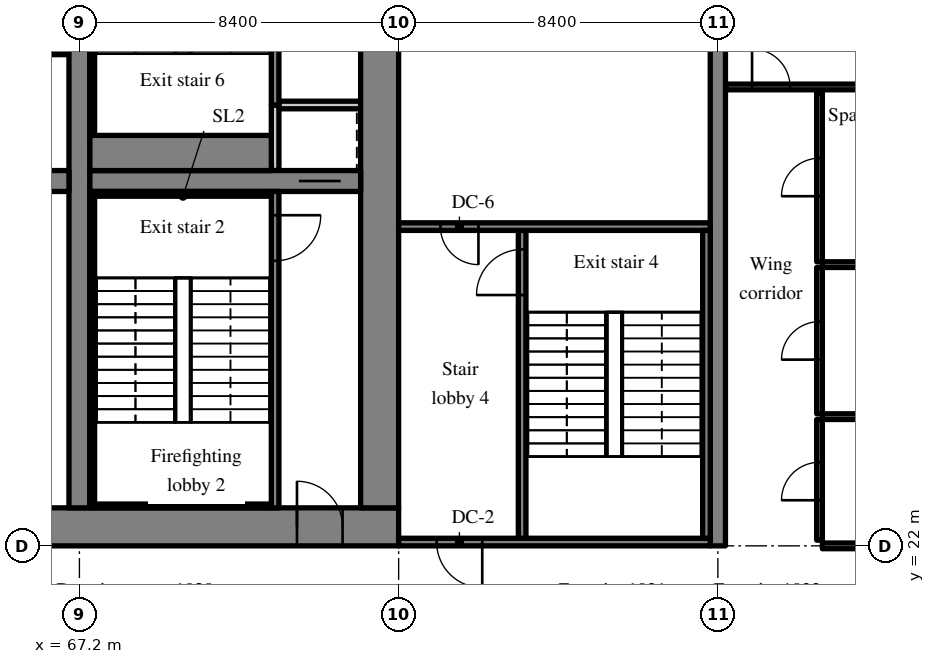
"""IFC4 building model, lengths in metres.
Left out: names, types, materials, properties, quantities, classifications, styles, units other than length and angle.
Written with IfcOpenShell. Run it as: python <this file> out.ifc"""

import sys

from ifc_helpers import new_model, si_unit, direction, frame, frame_2d, origin, place, context, subcontext, project, spatial, rectangle, extrude, source, transform, mapped, element, fill, save


model = new_model("IFC4")
c1 = context("Model", 3, precision=1e-05, world=origin(), true_north=direction((0.0, 1.0)))
c2 = subcontext(c1, "Body", "Model", "MODEL_VIEW")
j1 = project(units=[si_unit("LENGTHUNIT", "METRE"), si_unit("PLANEANGLEUNIT", "RADIAN")], contexts=[c1])
p1 = place(None, origin())
s1 = spatial("IfcSite", under=j1, at=p1, CompositionType="ELEMENT")
p2 = place(p1, origin())
s2 = spatial("IfcBuilding", under=s1, at=p2, CompositionType="ELEMENT")
p3 = place(p2, frame((0.0, 0.0, 46.8)))
s3 = spatial("IfcBuildingStorey", under=s2, at=p3, CompositionType="ELEMENT", Elevation=46.8)
m1 = source(origin(), c2, "Body", "SweptSolid", [
    extrude(rectangle(XDim=50.4, YDim=1.0, at=frame_2d((25.2, 0.0))), origin(), (0.0, 0.0, 1.0), 3.52),
])
p4 = place(p3, frame((25.2, 22.5, 0.0), z_axis=(0.0, 0.0, 1.0), x_axis=(1.0, 0.0, 0.0)))
e1 = element("IfcWall", 1, at=p4, inside=s3, PredefinedType="SHEAR", context=c2, shape_type="MappedRepresentation", body=[
    mapped(m1, transform((0.0, 0.0, 0.0), scale=1.0)),
])
m2 = source(origin(), c2, "Body", "SweptSolid", [
    extrude(rectangle(XDim=1.8, YDim=2.1, at=frame_2d((0.9, 1.05))), frame((0.0, 0.51, 0.0), z_axis=(0.0, -1.0, 0.0), x_axis=(1.0, 0.0, 0.0)), (0.0, 0.0, 1.0), 1.02),
])
p5 = place(p4, frame((15.9, 0.0, 0.0)))
e2 = element("IfcOpeningElement", 2, at=p5, cuts=e1, PredefinedType="OPENING", context=c2, shape_type="MappedRepresentation", body=[
    mapped(m2, transform((0.0, 0.0, 0.0), scale=1.0)),
])
m3 = source(origin(), c2, "Body", "SweptSolid", [
    extrude(rectangle(XDim=1.2, YDim=2.1, at=frame_2d((0.6, 1.05))), frame((0.0, 0.51, 0.0), z_axis=(0.0, -1.0, 0.0), x_axis=(1.0, 0.0, 0.0)), (0.0, 0.0, 1.0), 1.02),
])
p6 = place(p4, frame((26.987, 0.0, 0.0)))
e3 = element("IfcOpeningElement", 3, at=p6, cuts=e1, PredefinedType="OPENING", context=c2, shape_type="MappedRepresentation", body=[
    mapped(m3, transform((0.0, 0.0, 0.0), scale=1.0)),
])
m4 = source(origin(), c2, "Body", "SweptSolid", [
    extrude(rectangle(XDim=0.9, YDim=2.1, at=frame_2d((0.45, 1.05))), frame((0.0, 0.51, 0.0), z_axis=(0.0, -1.0, 0.0), x_axis=(1.0, 0.0, 0.0)), (0.0, 0.0, 1.0), 1.02),
])
p7 = place(p4, frame((33.75, 0.0, 0.0)))
e4 = element("IfcOpeningElement", 4, at=p7, cuts=e1, PredefinedType="OPENING", context=c2, shape_type="MappedRepresentation", body=[
    mapped(m4, transform((0.0, 0.0, 0.0), scale=1.0)),
])
p8 = place(p4, frame((30.75, 0.0, 0.0)))
e5 = element("IfcOpeningElement", 5, at=p8, cuts=e1, PredefinedType="OPENING", context=c2, shape_type="MappedRepresentation", body=[
    mapped(m4, transform((0.0, 0.0, 0.0), scale=1.0)),
])
p9 = place(p4, frame((38.262, 0.0, 0.0)))
e6 = element("IfcOpeningElement", 6, at=p9, cuts=e1, PredefinedType="OPENING", context=c2, shape_type="MappedRepresentation", body=[
    mapped(m4, transform((0.0, 0.0, 0.0), scale=1.0)),
])
p10 = place(p4, frame((6.438, 0.0, 0.0)))
e7 = element("IfcOpeningElement", 7, at=p10, cuts=e1, PredefinedType="OPENING", context=c2, shape_type="MappedRepresentation", body=[
    mapped(m3, transform((0.0, 0.0, 0.0), scale=1.0)),
])
p11 = place(p4, frame((47.725, 0.0, 0.0)))
e8 = element("IfcOpeningElement", 8, at=p11, cuts=e1, PredefinedType="OPENING", context=c2, shape_type="MappedRepresentation", body=[
    mapped(m3, transform((0.0, 0.0, 0.0), scale=1.0)),
])
m5 = source(origin(), c2, "Body", "SweptSolid", [
    extrude(rectangle(XDim=18.0, YDim=1.0, at=frame_2d((9.0, 0.0))), origin(), (0.0, 0.0, 1.0), 3.52),
])
p12 = place(p3, frame((75.1, 23.0, 0.0), z_axis=(0.0, 0.0, 1.0), x_axis=(0.0, 1.0, 0.0)))
e9 = element("IfcWall", 9, at=p12, inside=s3, PredefinedType="SHEAR", context=c2, shape_type="MappedRepresentation", body=[
    mapped(m5, transform((0.0, 0.0, 0.0), scale=1.0)),
])
p13 = place(p12, frame((12.4, 0.0, 0.0)))
e10 = element("IfcOpeningElement", 10, at=p13, cuts=e9, PredefinedType="OPENING", context=c2, shape_type="MappedRepresentation", body=[
    mapped(m3, transform((0.0, 0.0, 0.0), scale=1.0)),
])
m6 = source(origin(), c2, "Body", "SweptSolid", [
    extrude(rectangle(XDim=18.0, YDim=0.55, at=frame_2d((9.0, 0.0))), origin(), (0.0, 0.0, 1.0), 3.52),
])
p14 = place(p3, frame((67.2, 23.0, 0.0), z_axis=(0.0, 0.0, 1.0), x_axis=(0.0, 1.0, 0.0)))
e11 = element("IfcWall", 11, at=p14, inside=s3, PredefinedType="SHEAR", context=c2, shape_type="MappedRepresentation", body=[
    mapped(m6, transform((0.0, 0.0, 0.0), scale=1.0)),
])
m7 = source(origin(), c2, "Body", "SweptSolid", [
    extrude(rectangle(XDim=16.25, YDim=0.55, at=frame_2d((8.125, 0.0))), origin(), (0.0, 0.0, 1.0), 3.52),
])
p15 = place(p3, frame((50.675, 31.6, 0.0), z_axis=(0.0, 0.0, 1.0), x_axis=(1.0, 0.0, 0.0)))
e12 = element("IfcWall", 12, at=p15, inside=s3, PredefinedType="SHEAR", context=c2, shape_type="MappedRepresentation", body=[
    mapped(m7, transform((0.0, 0.0, 0.0), scale=1.0)),
])
m8 = source(origin(), c2, "Body", "SweptSolid", [
    extrude(rectangle(XDim=1.0, YDim=2.1, at=frame_2d((0.5, 1.05))), frame((0.0, 0.285, 0.0), z_axis=(0.0, -1.0, 0.0), x_axis=(1.0, 0.0, 0.0)), (0.0, 0.0, 1.0), 0.57),
])
p16 = place(p15, frame((0.562, 0.0, 0.0)))
e13 = element("IfcOpeningElement", 13, at=p16, cuts=e12, PredefinedType="OPENING", context=c2, shape_type="MappedRepresentation", body=[
    mapped(m8, transform((0.0, 0.0, 0.0), scale=1.0)),
])
m9 = source(origin(), c2, "Body", "SweptSolid", [
    extrude(rectangle(XDim=7.125, YDim=0.55, at=frame_2d((3.562, 0.0))), origin(), (0.0, 0.0, 1.0), 3.52),
])
p17 = place(p3, frame((67.475, 31.6, 0.0), z_axis=(0.0, 0.0, 1.0), x_axis=(1.0, 0.0, 0.0)))
e14 = element("IfcWall", 14, at=p17, inside=s3, PredefinedType="SHEAR", context=c2, shape_type="MappedRepresentation", body=[
    mapped(m9, transform((0.0, 0.0, 0.0), scale=1.0)),
])
m10 = source(origin(), c2, "Body", "SweptSolid", [
    extrude(rectangle(XDim=1.1, YDim=2.1, at=frame_2d((0.55, 1.05))), frame((0.0, 0.285, 0.0), z_axis=(0.0, -1.0, 0.0), x_axis=(1.0, 0.0, 0.0)), (0.0, 0.0, 1.0), 0.57),
])
p18 = place(p17, frame((5.5, 0.0, 0.0)))
e15 = element("IfcOpeningElement", 15, at=p18, cuts=e14, PredefinedType="OPENING", context=c2, shape_type="MappedRepresentation", body=[
    mapped(m10, transform((0.0, 0.0, 0.0), scale=1.0)),
])
m11 = source(origin(), c2, "Body", "SweptSolid", [
    extrude(rectangle(XDim=20.0, YDim=0.4, at=frame_2d((10.0, 0.0))), origin(), (0.0, 0.0, 1.0), 3.52),
])
p19 = place(p3, frame((84.0, 22.0, 0.0), z_axis=(0.0, 0.0, 1.0), x_axis=(0.0, 1.0, 0.0)))
e16 = element("IfcWall", 16, at=p19, inside=s3, PredefinedType="SHEAR", context=c2, shape_type="MappedRepresentation", body=[
    mapped(m11, transform((0.0, 0.0, 0.0), scale=1.0)),
])
m12 = source(origin(), c2, "Body", "SweptSolid", [
    extrude(rectangle(XDim=14.125, YDim=0.15, at=frame_2d((7.062, 0.0))), origin(), (0.0, 0.0, 1.0), 3.52),
])
p20 = place(p3, frame((66.925, 35.0, 0.0), z_axis=(0.0, 0.0, 1.0), x_axis=(-1.0, 0.0, 0.0)))
e17 = element("IfcWall", 17, at=p20, inside=s3, PredefinedType="PARTITIONING", context=c2, shape_type="MappedRepresentation", body=[
    mapped(m12, transform((0.0, 0.0, 0.0), scale=1.0)),
])
m13 = source(origin(), c2, "Body", "SweptSolid", [
    extrude(rectangle(XDim=0.9, YDim=2.1, at=frame_2d((0.45, 1.05))), frame((0.0, 0.085, 0.0), z_axis=(0.0, -1.0, 0.0), x_axis=(1.0, 0.0, 0.0)), (0.0, 0.0, 1.0), 0.17),
])
p21 = place(p20, frame((3.414, 0.0, 0.0)))
e18 = element("IfcOpeningElement", 18, at=p21, cuts=e17, PredefinedType="OPENING", context=c2, shape_type="MappedRepresentation", body=[
    mapped(m13, transform((0.0, 0.0, 0.0), scale=1.0)),
])
p22 = place(p20, frame((10.439, 0.0, 0.0)))
e19 = element("IfcOpeningElement", 19, at=p22, cuts=e17, PredefinedType="OPENING", context=c2, shape_type="MappedRepresentation", body=[
    mapped(m13, transform((0.0, 0.0, 0.0), scale=1.0)),
])
m14 = source(origin(), c2, "Body", "SweptSolid", [
    extrude(rectangle(XDim=8.325, YDim=0.2, at=frame_2d((4.163, 0.0))), origin(), (0.0, 0.0, 1.0), 3.52),
])
p23 = place(p3, frame((72.35, 23.0, 0.0), z_axis=(0.0, 0.0, 1.0), x_axis=(0.0, 1.0, 0.0)))
e20 = element("IfcWall", 20, at=p23, inside=s3, PredefinedType="SOLIDWALL", context=c2, shape_type="MappedRepresentation", body=[
    mapped(m14, transform((0.0, 0.0, 0.0), scale=1.0)),
])
m15 = source(origin(), c2, "Body", "SweptSolid", [
    extrude(rectangle(XDim=1.2, YDim=2.1, at=frame_2d((0.6, 1.05))), frame((0.0, 0.11, 0.0), z_axis=(0.0, -1.0, 0.0), x_axis=(1.0, 0.0, 0.0)), (0.0, 0.0, 1.0), 0.22),
])
p24 = place(p23, frame((6.5, 0.0, 0.0)))
e21 = element("IfcOpeningElement", 21, at=p24, cuts=e20, PredefinedType="OPENING", context=c2, shape_type="MappedRepresentation", body=[
    mapped(m15, transform((0.0, 0.0, 0.0), scale=1.0)),
])
m16 = source(origin(), c2, "Body", "SweptSolid", [
    extrude(rectangle(XDim=1.725, YDim=0.2, at=frame_2d((0.863, 0.0))), origin(), (0.0, 0.0, 1.0), 3.52),
])
p25 = place(p3, frame((72.35, 31.875, 0.0), z_axis=(0.0, 0.0, 1.0), x_axis=(0.0, 1.0, 0.0)))
e22 = element("IfcWall", 22, at=p25, inside=s3, PredefinedType="SOLIDWALL", context=c2, shape_type="MappedRepresentation", body=[
    mapped(m16, transform((0.0, 0.0, 0.0), scale=1.0)),
])
m17 = source(origin(), c2, "Body", "SweptSolid", [
    extrude(rectangle(XDim=2.15, YDim=0.2, at=frame_2d((1.075, 0.0))), origin(), (0.0, 0.0, 1.0), 3.52),
])
p26 = place(p3, frame((72.45, 33.6, 0.0), z_axis=(0.0, 0.0, 1.0), x_axis=(1.0, 0.0, 0.0)))
e23 = element("IfcWall", 23, at=p26, inside=s3, PredefinedType="SOLIDWALL", context=c2, shape_type="MappedRepresentation", body=[
    mapped(m17, transform((0.0, 0.0, 0.0), scale=1.0)),
])
m18 = source(origin(), c2, "Body", "SweptSolid", [
    extrude(rectangle(XDim=7.4, YDim=0.2, at=frame_2d((3.7, 0.0))), origin(), (0.0, 0.0, 1.0), 3.52),
])
p27 = place(p3, frame((72.35, 33.6, 0.0), z_axis=(0.0, 0.0, 1.0), x_axis=(0.0, 1.0, 0.0)))
e24 = element("IfcWall", 24, at=p27, inside=s3, PredefinedType="SOLIDWALL", context=c2, shape_type="MappedRepresentation", body=[
    mapped(m18, transform((0.0, 0.0, 0.0), scale=1.0)),
])
m19 = source(origin(), c2, "Body", "SweptSolid", [
    extrude(rectangle(XDim=1.8, YDim=2.1, at=frame_2d((0.9, 1.05))), frame((0.0, 0.11, 0.0), z_axis=(0.0, -1.0, 0.0), x_axis=(1.0, 0.0, 0.0)), (0.0, 0.0, 1.0), 0.22),
])
p28 = place(p27, frame((5.3, 0.0, 0.0)))
e25 = element("IfcOpeningElement", 25, at=p28, cuts=e24, PredefinedType="OPENING", context=c2, shape_type="MappedRepresentation", body=[
    mapped(m19, transform((0.0, 0.0, 0.0), scale=1.0)),
])
m20 = source(origin(), c2, "Body", "SweptSolid", [
    extrude(rectangle(XDim=8.3, YDim=0.2, at=frame_2d((4.15, 0.0))), origin(), (0.0, 0.0, 1.0), 3.52),
])
p29 = place(p3, frame((78.85, 22.1, 0.0), z_axis=(0.0, 0.0, 1.0), x_axis=(0.0, 1.0, 0.0)))
e26 = element("IfcWall", 26, at=p29, inside=s3, PredefinedType="SOLIDWALL", context=c2, shape_type="MappedRepresentation", body=[
    mapped(m20, transform((0.0, 0.0, 0.0), scale=1.0)),
])
p30 = place(p29, frame((6.5, 0.0, 0.0)))
e27 = element("IfcOpeningElement", 27, at=p30, cuts=e26, PredefinedType="OPENING", context=c2, shape_type="MappedRepresentation", body=[
    mapped(m15, transform((0.0, 0.0, 0.0), scale=1.0)),
])
m21 = source(origin(), c2, "Body", "SweptSolid", [
    extrude(rectangle(XDim=8.2, YDim=0.2, at=frame_2d((4.1, 0.0))), origin(), (0.0, 0.0, 1.0), 3.52),
])
p31 = place(p3, frame((83.8, 22.1, 0.0), z_axis=(0.0, 0.0, 1.0), x_axis=(-1.0, 0.0, 0.0)))
e28 = element("IfcWall", 28, at=p31, inside=s3, PredefinedType="SOLIDWALL", context=c2, shape_type="MappedRepresentation", body=[
    mapped(m21, transform((0.0, 0.0, 0.0), scale=1.0)),
])
p32 = place(p31, frame((6.0, 0.0, 0.0)))
e29 = element("IfcOpeningElement", 29, at=p32, cuts=e28, PredefinedType="OPENING", context=c2, shape_type="MappedRepresentation", body=[
    mapped(m15, transform((0.0, 0.0, 0.0), scale=1.0)),
])
p33 = place(p3, frame((83.8, 30.4, 0.0), z_axis=(0.0, 0.0, 1.0), x_axis=(-1.0, 0.0, 0.0)))
e30 = element("IfcWall", 30, at=p33, inside=s3, PredefinedType="SOLIDWALL", context=c2, shape_type="MappedRepresentation", body=[
    mapped(m21, transform((0.0, 0.0, 0.0), scale=1.0)),
])
m22 = source(origin(), c2, "Body", "SweptSolid", [
    extrude(rectangle(XDim=1.0, YDim=2.1, at=frame_2d((0.5, 1.05))), frame((0.0, 0.11, 0.0), z_axis=(0.0, -1.0, 0.0), x_axis=(1.0, 0.0, 0.0)), (0.0, 0.0, 1.0), 0.22),
])
p34 = place(p33, frame((6.1, 0.0, 0.0)))
e31 = element("IfcOpeningElement", 31, at=p34, cuts=e30, PredefinedType="OPENING", context=c2, shape_type="MappedRepresentation", body=[
    mapped(m22, transform((0.0, 0.0, 0.0), scale=1.0)),
])
m23 = source(origin(), c2, "Body", "SweptSolid", [
    extrude(rectangle(XDim=4.775, YDim=0.1, at=frame_2d((2.387, 0.0))), origin(), (0.0, 0.0, 1.0), 3.52),
])
p35 = place(p3, frame((67.475, 23.05, 0.0), z_axis=(0.0, 0.0, 1.0), x_axis=(1.0, 0.0, 0.0)))
e32 = element("IfcWall", 32, at=p35, inside=s3, PredefinedType="SOLIDWALL", context=c2, shape_type="MappedRepresentation", body=[
    mapped(m23, transform((0.0, 0.0, 0.0), scale=1.0)),
])
m24 = source(origin(), c2, "Body", "SweptSolid", [
    extrude(rectangle(XDim=4.775, YDim=0.125, at=frame_2d((2.387, 0.0))), origin(), (0.0, 0.0, 1.0), 3.52),
])
p36 = place(p3, frame((67.475, 31.262, 0.0), z_axis=(0.0, 0.0, 1.0), x_axis=(1.0, 0.0, 0.0)))
e33 = element("IfcWall", 33, at=p36, inside=s3, PredefinedType="SOLIDWALL", context=c2, shape_type="MappedRepresentation", body=[
    mapped(m24, transform((0.0, 0.0, 0.0), scale=1.0)),
])
m25 = source(origin(), c2, "Body", "SweptSolid", [
    extrude(rectangle(XDim=8.1, YDim=0.125, at=frame_2d((4.05, 0.0))), origin(), (0.0, 0.0, 1.0), 3.52),
])
p37 = place(p3, frame((67.537, 23.1, 0.0), z_axis=(0.0, 0.0, 1.0), x_axis=(0.0, 1.0, 0.0)))
e34 = element("IfcWall", 34, at=p37, inside=s3, PredefinedType="SOLIDWALL", context=c2, shape_type="MappedRepresentation", body=[
    mapped(m25, transform((0.0, 0.0, 0.0), scale=1.0)),
])
m26 = source(origin(), c2, "Body", "SweptSolid", [
    extrude(rectangle(XDim=4.775, YDim=0.925, at=frame_2d((2.387, 0.0))), origin(), (0.0, 0.0, 1.0), 3.52),
])
p38 = place(p3, frame((67.475, 32.337, 0.0), z_axis=(0.0, 0.0, 1.0), x_axis=(1.0, 0.0, 0.0)))
e35 = element("IfcWall", 35, at=p38, inside=s3, PredefinedType="SOLIDWALL", context=c2, shape_type="MappedRepresentation", body=[
    mapped(m26, transform((0.0, 0.0, 0.0), scale=1.0)),
])
p39 = place(p3, frame((67.537, 32.8, 0.0), z_axis=(0.0, 0.0, 1.0), x_axis=(0.0, 1.0, 0.0)))
e36 = element("IfcWall", 36, at=p39, inside=s3, PredefinedType="SOLIDWALL", context=c2, shape_type="MappedRepresentation", body=[
    mapped(m25, transform((0.0, 0.0, 0.0), scale=1.0)),
])
m27 = source(origin(), c2, "Body", "SweptSolid", [
    extrude(rectangle(XDim=8.1, YDim=0.2, at=frame_2d((4.05, 0.0))), origin(), (0.0, 0.0, 1.0), 3.52),
])
p40 = place(p3, frame((83.7, 22.2, 0.0), z_axis=(0.0, 0.0, 1.0), x_axis=(0.0, 1.0, 0.0)))
e37 = element("IfcWall", 37, at=p40, inside=s3, PredefinedType="SOLIDWALL", context=c2, shape_type="MappedRepresentation", body=[
    mapped(m27, transform((0.0, 0.0, 0.0), scale=1.0)),
])
m28 = source(origin(), c2, "Body", "SweptSolid", [
    extrude(rectangle(XDim=5.45, YDim=0.15, at=frame_2d((2.725, 0.0))), origin(), (0.0, 0.0, 1.0), 2.82),
])
p41 = place(p3, frame((86.75, 22.0, 0.0), z_axis=(0.0, 0.0, 1.0), x_axis=(1.0, 0.0, 0.0)))
e38 = element("IfcWall", 38, at=p41, inside=s3, PredefinedType="PARTITIONING", context=c2, shape_type="MappedRepresentation", body=[
    mapped(m28, transform((0.0, 0.0, 0.0), scale=1.0)),
])
m29 = source(origin(), c2, "Body", "SweptSolid", [
    extrude(rectangle(XDim=3.175, YDim=0.15, at=frame_2d((1.587, 0.0))), origin(), (0.0, 0.0, 1.0), 3.52),
])
p42 = place(p3, frame((86.675, 22.15, 0.0), z_axis=(0.0, 0.0, 1.0), x_axis=(0.0, 1.0, 0.0)))
e39 = element("IfcWall", 39, at=p42, inside=s3, PredefinedType="PARTITIONING", context=c2, shape_type="MappedRepresentation", body=[
    mapped(m29, transform((0.0, 0.0, 0.0), scale=1.0)),
])
m30 = source(origin(), c2, "Body", "SweptSolid", [
    extrude(rectangle(XDim=1.0, YDim=2.1, at=frame_2d((0.5, 1.05))), frame((0.0, 0.085, 0.0), z_axis=(0.0, -1.0, 0.0), x_axis=(1.0, 0.0, 0.0)), (0.0, 0.0, 1.0), 0.17),
])
p43 = place(p42, frame((1.05, 0.0, 0.0)))
e40 = element("IfcOpeningElement", 40, at=p43, cuts=e39, PredefinedType="OPENING", context=c2, shape_type="MappedRepresentation", body=[
    mapped(m30, transform((0.0, 0.0, 0.0), scale=1.0)),
])
m31 = source(origin(), c2, "Body", "SweptSolid", [
    extrude(rectangle(XDim=5.45, YDim=0.15, at=frame_2d((2.725, 0.0))), origin(), (0.0, 0.0, 1.0), 3.52),
])
p44 = place(p3, frame((86.75, 25.4, 0.0), z_axis=(0.0, 0.0, 1.0), x_axis=(1.0, 0.0, 0.0)))
e41 = element("IfcWall", 41, at=p44, inside=s3, PredefinedType="PARTITIONING", context=c2, shape_type="MappedRepresentation", body=[
    mapped(m31, transform((0.0, 0.0, 0.0), scale=1.0)),
])
m32 = source(origin(), c2, "Body", "SweptSolid", [
    extrude(rectangle(XDim=3.85, YDim=0.15, at=frame_2d((1.925, 0.0))), origin(), (0.0, 0.0, 1.0), 3.52),
])
p45 = place(p3, frame((86.675, 25.475, 0.0), z_axis=(0.0, 0.0, 1.0), x_axis=(0.0, 1.0, 0.0)))
e42 = element("IfcWall", 42, at=p45, inside=s3, PredefinedType="PARTITIONING", context=c2, shape_type="MappedRepresentation", body=[
    mapped(m32, transform((0.0, 0.0, 0.0), scale=1.0)),
])
p46 = place(p45, frame((1.425, 0.0, 0.0)))
e43 = element("IfcOpeningElement", 43, at=p46, cuts=e42, PredefinedType="OPENING", context=c2, shape_type="MappedRepresentation", body=[
    mapped(m30, transform((0.0, 0.0, 0.0), scale=1.0)),
])
p47 = place(p3, frame((86.75, 29.4, 0.0), z_axis=(0.0, 0.0, 1.0), x_axis=(1.0, 0.0, 0.0)))
e44 = element("IfcWall", 44, at=p47, inside=s3, PredefinedType="PARTITIONING", context=c2, shape_type="MappedRepresentation", body=[
    mapped(m31, transform((0.0, 0.0, 0.0), scale=1.0)),
])
m33 = source(origin(), c2, "Body", "SweptSolid", [
    extrude(rectangle(XDim=4.45, YDim=0.15, at=frame_2d((2.225, 0.0))), origin(), (0.0, 0.0, 1.0), 3.52),
])
p48 = place(p3, frame((86.675, 29.475, 0.0), z_axis=(0.0, 0.0, 1.0), x_axis=(0.0, 1.0, 0.0)))
e45 = element("IfcWall", 45, at=p48, inside=s3, PredefinedType="PARTITIONING", context=c2, shape_type="MappedRepresentation", body=[
    mapped(m33, transform((0.0, 0.0, 0.0), scale=1.0)),
])
p49 = place(p48, frame((1.725, 0.0, 0.0)))
e46 = element("IfcOpeningElement", 46, at=p49, cuts=e45, PredefinedType="OPENING", context=c2, shape_type="MappedRepresentation", body=[
    mapped(m30, transform((0.0, 0.0, 0.0), scale=1.0)),
])
m34 = source(origin(), c2, "Body", "SweptSolid", [
    extrude(rectangle(XDim=8.0, YDim=0.15, at=frame_2d((4.0, 0.0))), origin(), (0.0, 0.0, 1.0), 3.52),
])
p50 = place(p3, frame((84.2, 34.075, 0.0), z_axis=(0.0, 0.0, 1.0), x_axis=(1.0, 0.0, 0.0)))
e47 = element("IfcWall", 47, at=p50, inside=s3, PredefinedType="PARTITIONING", context=c2, shape_type="MappedRepresentation", body=[
    mapped(m34, transform((0.0, 0.0, 0.0), scale=1.0)),
])
p51 = place(p50, frame((0.7, 0.0, 0.0)))
e48 = element("IfcOpeningElement", 48, at=p51, cuts=e47, PredefinedType="OPENING", context=c2, shape_type="MappedRepresentation", body=[
    mapped(m30, transform((0.0, 0.0, 0.0), scale=1.0)),
])
m35 = source(origin(), c2, "Body", "SweptSolid", [
    extrude(rectangle(XDim=1.2, YDim=2.1, at=frame_2d((0.6, 1.05))), frame((0.0, 0.025, 0.0), z_axis=(0.0, -1.0, 0.0), x_axis=(1.0, 0.0, 0.0)), (0.0, 0.0, 1.0), 0.05),
])
p52 = place(p24, origin())
e49 = element("IfcDoor", 49, at=p52, inside=s3, OperationType="SINGLE_SWING_RIGHT", PredefinedType="DOOR", context=c2, shape_type="MappedRepresentation", body=[
    mapped(m35, transform((0.0, 0.0, 0.0), scale=1.0)),
])
fill(e21, e49)
m36 = source(origin(), c2, "Body", "SweptSolid", [
    extrude(rectangle(XDim=1.2, YDim=2.1, at=frame_2d((0.6, 1.05))), frame((0.0, 0.375, 0.0), z_axis=(0.0, -1.0, 0.0), x_axis=(1.0, 0.0, 0.0)), (0.0, 0.0, 1.0), 0.05),
])
p53 = place(p11, origin())
e50 = element("IfcDoor", 50, at=p53, inside=s3, OperationType="SINGLE_SWING_LEFT", PredefinedType="DOOR", context=c2, shape_type="MappedRepresentation", body=[
    mapped(m36, transform((0.0, 0.0, 0.0), scale=1.0)),
])
fill(e8, e50)
m37 = source(origin(), c2, "Body", "SweptSolid", [
    extrude(rectangle(XDim=1.1, YDim=2.1, at=frame_2d((0.55, 1.05))), frame((0.0, 0.025, 0.0), z_axis=(0.0, -1.0, 0.0), x_axis=(1.0, 0.0, 0.0)), (0.0, 0.0, 1.0), 0.05),
])
p54 = place(p18, origin())
e51 = element("IfcDoor", 51, at=p54, inside=s3, OperationType="SLIDING_TO_LEFT", PredefinedType="DOOR", context=c2, shape_type="MappedRepresentation", body=[
    mapped(m37, transform((0.0, 0.0, 0.0), scale=1.0)),
])
fill(e15, e51)
p55 = place(p30, origin())
e52 = element("IfcDoor", 52, at=p55, inside=s3, OperationType="SINGLE_SWING_LEFT", PredefinedType="DOOR", context=c2, shape_type="MappedRepresentation", body=[
    mapped(m35, transform((0.0, 0.0, 0.0), scale=1.0)),
])
fill(e27, e52)
p56 = place(p32, origin())
e53 = element("IfcDoor", 53, at=p56, inside=s3, OperationType="SINGLE_SWING_LEFT", PredefinedType="DOOR", context=c2, shape_type="MappedRepresentation", body=[
    mapped(m35, transform((0.0, 0.0, 0.0), scale=1.0)),
])
fill(e29, e53)
m38 = source(origin(), c2, "Body", "SweptSolid", [
    extrude(rectangle(XDim=1.0, YDim=2.1, at=frame_2d((0.5, 1.05))), frame((0.0, 0.025, 0.0), z_axis=(0.0, -1.0, 0.0), x_axis=(1.0, 0.0, 0.0)), (0.0, 0.0, 1.0), 0.05),
])
p57 = place(p34, origin())
e54 = element("IfcDoor", 54, at=p57, inside=s3, OperationType="SINGLE_SWING_LEFT", PredefinedType="DOOR", context=c2, shape_type="MappedRepresentation", body=[
    mapped(m38, transform((0.0, 0.0, 0.0), scale=1.0)),
])
fill(e31, e54)
p58 = place(p43, origin())
e55 = element("IfcDoor", 55, at=p58, inside=s3, OperationType="SINGLE_SWING_LEFT", PredefinedType="DOOR", context=c2, shape_type="MappedRepresentation", body=[
    mapped(m38, transform((0.0, 0.0, 0.0), scale=1.0)),
])
fill(e40, e55)
p59 = place(p46, origin())
e56 = element("IfcDoor", 56, at=p59, inside=s3, OperationType="SINGLE_SWING_LEFT", PredefinedType="DOOR", context=c2, shape_type="MappedRepresentation", body=[
    mapped(m38, transform((0.0, 0.0, 0.0), scale=1.0)),
])
fill(e43, e56)
p60 = place(p49, origin())
e57 = element("IfcDoor", 57, at=p60, inside=s3, OperationType="SINGLE_SWING_LEFT", PredefinedType="DOOR", context=c2, shape_type="MappedRepresentation", body=[
    mapped(m38, transform((0.0, 0.0, 0.0), scale=1.0)),
])
fill(e46, e57)
p61 = place(p51, origin())
e58 = element("IfcDoor", 58, at=p61, inside=s3, OperationType="SINGLE_SWING_LEFT", PredefinedType="DOOR", context=c2, shape_type="MappedRepresentation", body=[
    mapped(m38, transform((0.0, 0.0, 0.0), scale=1.0)),
])
fill(e48, e58)
save(model, sys.argv[1])
